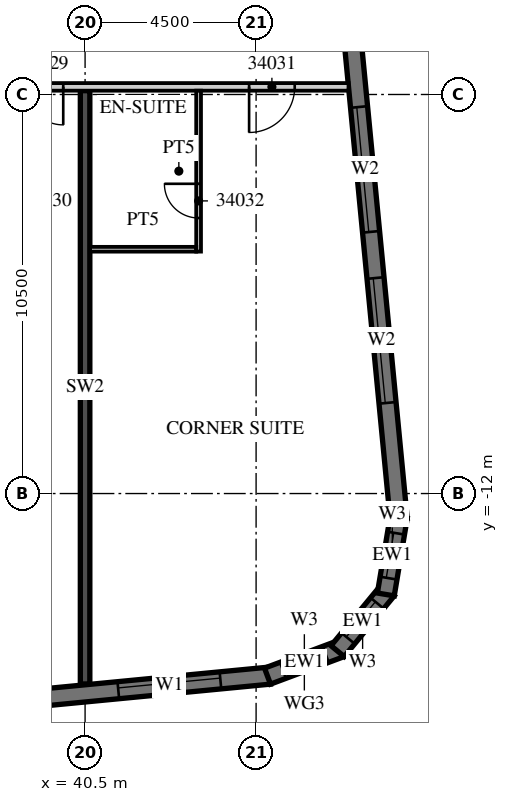
"""IFC4 building model, lengths in metres.
Left out: names, types, materials, properties, quantities, classifications, styles, units other than length and angle.
Written with IfcOpenShell. Run it as: python <this file> out.ifc"""

import sys

from ifc_helpers import new_model, si_unit, direction, frame, frame_2d, origin, place, context, subcontext, project, spatial, polyline, rectangle, outline, extrude, element, fill, save


model = new_model("IFC4")
c1 = context("Model", 3, precision=1e-05, world=origin(), true_north=direction((0.0, 1.0)))
c2 = subcontext(c1, "Body", "Model", "MODEL_VIEW")
j1 = project(units=[si_unit("LENGTHUNIT", "METRE"), si_unit("PLANEANGLEUNIT", "RADIAN")], contexts=[c1])
p1 = place(None, origin())
s1 = spatial("IfcSite", under=j1, at=p1, CompositionType="ELEMENT")
p2 = place(p1, origin())
s2 = spatial("IfcBuilding", under=s1, at=p2, CompositionType="ELEMENT")
p3 = place(p2, frame((0.0, 0.0, 147.1)))
s3 = spatial("IfcBuildingStorey", under=s2, at=p3, CompositionType="ELEMENT", Elevation=147.1)
p4 = place(p3, frame((40.5, -17.011, 0.0), z_axis=(0.0, 0.0, 1.0), x_axis=(0.0, 1.0, 0.0)))
e1 = element("IfcWall", 1, at=p4, inside=s3, PredefinedType="SHEAR", context=c2, shape_type="SweptSolid", body=[
    extrude(rectangle(XDim=15.611, YDim=0.25, at=frame_2d((7.805, 0.0))), origin(), (0.0, 0.0, 1.0), 3.0),
])
p5 = place(p3, frame((-13.521, -22.46, 0.0), z_axis=(0.0, 0.0, 1.0), x_axis=(0.995396096335, 0.095846812164, 0.0)))
e2 = element("IfcWall", 2, at=p5, inside=s3, PredefinedType="SOLIDWALL", context=c2, shape_type="SweptSolid", body=[
    extrude(rectangle(XDim=59.151, YDim=0.45, at=frame_2d((29.575, 0.0))), origin(), (0.0, 0.0, 1.0), 3.0),
])
p6 = place(p5, frame((0.91, 0.0, 0.45)))
e3 = element("IfcOpeningElement", 3, at=p6, cuts=e2, PredefinedType="OPENING", context=c2, shape_type="SweptSolid", body=[
    extrude(rectangle(XDim=2.7, YDim=2.25, at=frame_2d((1.35, 1.125))), frame((0.0, 0.235, 0.0), z_axis=(0.0, -1.0, 0.0), x_axis=(1.0, 0.0, 0.0)), (0.0, 0.0, 1.0), 0.47),
])
p7 = place(p5, frame((5.431, 0.0, 0.45)))
e4 = element("IfcOpeningElement", 4, at=p7, cuts=e2, PredefinedType="OPENING", context=c2, shape_type="SweptSolid", body=[
    extrude(rectangle(XDim=2.7, YDim=2.25, at=frame_2d((1.35, 1.125))), frame((0.0, 0.235, 0.0), z_axis=(0.0, -1.0, 0.0), x_axis=(1.0, 0.0, 0.0)), (0.0, 0.0, 1.0), 0.47),
])
p8 = place(p5, frame((9.952, 0.0, 0.45)))
e5 = element("IfcOpeningElement", 5, at=p8, cuts=e2, PredefinedType="OPENING", context=c2, shape_type="SweptSolid", body=[
    extrude(rectangle(XDim=2.7, YDim=2.25, at=frame_2d((1.35, 1.125))), frame((0.0, 0.235, 0.0), z_axis=(0.0, -1.0, 0.0), x_axis=(1.0, 0.0, 0.0)), (0.0, 0.0, 1.0), 0.47),
])
p9 = place(p5, frame((14.473, 0.0, 0.45)))
e6 = element("IfcOpeningElement", 6, at=p9, cuts=e2, PredefinedType="OPENING", context=c2, shape_type="SweptSolid", body=[
    extrude(rectangle(XDim=2.7, YDim=2.25, at=frame_2d((1.35, 1.125))), frame((0.0, 0.235, 0.0), z_axis=(0.0, -1.0, 0.0), x_axis=(1.0, 0.0, 0.0)), (0.0, 0.0, 1.0), 0.47),
])
p10 = place(p5, frame((18.994, 0.0, 0.45)))
e7 = element("IfcOpeningElement", 7, at=p10, cuts=e2, PredefinedType="OPENING", context=c2, shape_type="SweptSolid", body=[
    extrude(rectangle(XDim=2.7, YDim=2.25, at=frame_2d((1.35, 1.125))), frame((0.0, 0.235, 0.0), z_axis=(0.0, -1.0, 0.0), x_axis=(1.0, 0.0, 0.0)), (0.0, 0.0, 1.0), 0.47),
])
p11 = place(p5, frame((23.514, 0.0, 0.45)))
e8 = element("IfcOpeningElement", 8, at=p11, cuts=e2, PredefinedType="OPENING", context=c2, shape_type="SweptSolid", body=[
    extrude(rectangle(XDim=2.7, YDim=2.25, at=frame_2d((1.35, 1.125))), frame((0.0, 0.235, 0.0), z_axis=(0.0, -1.0, 0.0), x_axis=(1.0, 0.0, 0.0)), (0.0, 0.0, 1.0), 0.47),
])
p12 = place(p5, frame((28.035, 0.0, 0.45)))
e9 = element("IfcOpeningElement", 9, at=p12, cuts=e2, PredefinedType="OPENING", context=c2, shape_type="SweptSolid", body=[
    extrude(rectangle(XDim=2.7, YDim=2.25, at=frame_2d((1.35, 1.125))), frame((0.0, 0.235, 0.0), z_axis=(0.0, -1.0, 0.0), x_axis=(1.0, 0.0, 0.0)), (0.0, 0.0, 1.0), 0.47),
])
p13 = place(p5, frame((32.556, 0.0, 0.45)))
e10 = element("IfcOpeningElement", 10, at=p13, cuts=e2, PredefinedType="OPENING", context=c2, shape_type="SweptSolid", body=[
    extrude(rectangle(XDim=2.7, YDim=2.25, at=frame_2d((1.35, 1.125))), frame((0.0, 0.235, 0.0), z_axis=(0.0, -1.0, 0.0), x_axis=(1.0, 0.0, 0.0)), (0.0, 0.0, 1.0), 0.47),
])
p14 = place(p5, frame((37.077, 0.0, 0.45)))
e11 = element("IfcOpeningElement", 11, at=p14, cuts=e2, PredefinedType="OPENING", context=c2, shape_type="SweptSolid", body=[
    extrude(rectangle(XDim=2.7, YDim=2.25, at=frame_2d((1.35, 1.125))), frame((0.0, 0.235, 0.0), z_axis=(0.0, -1.0, 0.0), x_axis=(1.0, 0.0, 0.0)), (0.0, 0.0, 1.0), 0.47),
])
p15 = place(p5, frame((41.598, 0.0, 0.45)))
e12 = element("IfcOpeningElement", 12, at=p15, cuts=e2, PredefinedType="OPENING", context=c2, shape_type="SweptSolid", body=[
    extrude(rectangle(XDim=2.7, YDim=2.25, at=frame_2d((1.35, 1.125))), frame((0.0, 0.235, 0.0), z_axis=(0.0, -1.0, 0.0), x_axis=(1.0, 0.0, 0.0)), (0.0, 0.0, 1.0), 0.47),
])
p16 = place(p5, frame((46.118, 0.0, 0.45)))
e13 = element("IfcOpeningElement", 13, at=p16, cuts=e2, PredefinedType="OPENING", context=c2, shape_type="SweptSolid", body=[
    extrude(rectangle(XDim=2.7, YDim=2.25, at=frame_2d((1.35, 1.125))), frame((0.0, 0.235, 0.0), z_axis=(0.0, -1.0, 0.0), x_axis=(1.0, 0.0, 0.0)), (0.0, 0.0, 1.0), 0.47),
])
p17 = place(p5, frame((50.639, 0.0, 0.45)))
e14 = element("IfcOpeningElement", 14, at=p17, cuts=e2, PredefinedType="OPENING", context=c2, shape_type="SweptSolid", body=[
    extrude(rectangle(XDim=2.7, YDim=2.25, at=frame_2d((1.35, 1.125))), frame((0.0, 0.235, 0.0), z_axis=(0.0, -1.0, 0.0), x_axis=(1.0, 0.0, 0.0)), (0.0, 0.0, 1.0), 0.47),
])
p18 = place(p5, frame((55.15, 0.0, 0.45)))
e15 = element("IfcOpeningElement", 15, at=p18, cuts=e2, PredefinedType="OPENING", context=c2, shape_type="SweptSolid", body=[
    extrude(rectangle(XDim=2.7, YDim=2.25, at=frame_2d((1.35, 1.125))), frame((0.0, 0.235, 0.0), z_axis=(0.0, -1.0, 0.0), x_axis=(1.0, 0.0, 0.0)), (0.0, 0.0, 1.0), 0.47),
])
p19 = place(p3, frame((45.3, -16.804, 0.0), z_axis=(0.0, 0.0, 1.0), x_axis=(0.936677599948, 0.350192909346, 0.0)))
e16 = element("IfcWall", 16, at=p19, inside=s3, PredefinedType="SOLIDWALL", context=c2, shape_type="SweptSolid", body=[
    extrude(outline(polyline([(0.0, -0.225), (2.071, -0.225), (1.95, 0.225), (0.121, 0.225), (0.0, -0.225)])), origin(), (0.0, 0.0, 1.0), 3.0),
])
p20 = place(p19, frame((0.435, 0.0, 0.45)))
e17 = element("IfcOpeningElement", 17, at=p20, cuts=e16, PredefinedType="OPENING", context=c2, shape_type="SweptSolid", body=[
    extrude(rectangle(XDim=1.2, YDim=2.25, at=frame_2d((0.6, 1.125))), frame((0.0, 0.235, 0.0), z_axis=(0.0, -1.0, 0.0), x_axis=(1.0, 0.0, 0.0)), (0.0, 0.0, 1.0), 0.47),
])
p21 = place(p3, frame((47.145, -16.147, 0.0), z_axis=(0.0, 0.0, 1.0), x_axis=(0.635988241739, 0.771698747161, 0.0)))
e18 = element("IfcWall", 18, at=p21, inside=s3, PredefinedType="SOLIDWALL", context=c2, shape_type="SweptSolid", body=[
    extrude(outline(polyline([(0.0, -0.225), (2.071, -0.225), (1.95, 0.225), (0.121, 0.225), (0.0, -0.225)])), origin(), (0.0, 0.0, 1.0), 3.0),
])
p22 = place(p21, frame((0.435, 0.0, 0.45)))
e19 = element("IfcOpeningElement", 19, at=p22, cuts=e18, PredefinedType="OPENING", context=c2, shape_type="SweptSolid", body=[
    extrude(rectangle(XDim=1.2, YDim=2.25, at=frame_2d((0.6, 1.125))), frame((0.0, 0.235, 0.0), z_axis=(0.0, -1.0, 0.0), x_axis=(1.0, 0.0, 0.0)), (0.0, 0.0, 1.0), 0.47),
])
p23 = place(p3, frame((48.413, -14.655, 0.0), z_axis=(0.0, 0.0, 1.0), x_axis=(0.165068144653, 0.986282164302, 0.0)))
e20 = element("IfcWall", 20, at=p23, inside=s3, PredefinedType="SOLIDWALL", context=c2, shape_type="SweptSolid", body=[
    extrude(outline(polyline([(0.0, -0.225), (2.071, -0.225), (1.95, 0.225), (0.121, 0.225), (0.0, -0.225)])), origin(), (0.0, 0.0, 1.0), 3.0),
])
p24 = place(p23, frame((0.435, 0.0, 0.45)))
e21 = element("IfcOpeningElement", 21, at=p24, cuts=e20, PredefinedType="OPENING", context=c2, shape_type="SweptSolid", body=[
    extrude(rectangle(XDim=1.2, YDim=2.25, at=frame_2d((0.6, 1.125))), frame((0.0, 0.235, 0.0), z_axis=(0.0, -1.0, 0.0), x_axis=(1.0, 0.0, 0.0)), (0.0, 0.0, 1.0), 0.47),
])
p25 = place(p3, frame((48.753, -12.672, 0.0), z_axis=(0.0, 0.0, 1.0), x_axis=(-0.095842661909, 0.995396495954, 0.0)))
e22 = element("IfcWall", 22, at=p25, inside=s3, PredefinedType="SOLIDWALL", context=c2, shape_type="SweptSolid", body=[
    extrude(rectangle(XDim=35.0, YDim=0.45, at=frame_2d((17.5, 0.0))), origin(), (0.0, 0.0, 1.0), 3.0),
])
p26 = place(p25, frame((3.072, 0.0, 0.45)))
e23 = element("IfcOpeningElement", 23, at=p26, cuts=e22, PredefinedType="OPENING", context=c2, shape_type="SweptSolid", body=[
    extrude(rectangle(XDim=3.3, YDim=2.25, at=frame_2d((1.65, 1.125))), frame((0.0, 0.235, 0.0), z_axis=(0.0, -1.0, 0.0), x_axis=(1.0, 0.0, 0.0)), (0.0, 0.0, 1.0), 0.47),
])
p27 = place(p25, frame((7.593, 0.0, 0.45)))
e24 = element("IfcOpeningElement", 24, at=p27, cuts=e22, PredefinedType="OPENING", context=c2, shape_type="SweptSolid", body=[
    extrude(rectangle(XDim=3.3, YDim=2.25, at=frame_2d((1.65, 1.125))), frame((0.0, 0.235, 0.0), z_axis=(0.0, -1.0, 0.0), x_axis=(1.0, 0.0, 0.0)), (0.0, 0.0, 1.0), 0.47),
])
p28 = place(p3, frame((-13.5, -1.3, 0.0), z_axis=(0.0, 0.0, 1.0), x_axis=(1.0, 0.0, 0.0)))
e25 = element("IfcWall", 25, at=p28, inside=s3, PredefinedType="PARTITIONING", context=c2, shape_type="SweptSolid", body=[
    extrude(rectangle(XDim=60.932, YDim=0.2, at=frame_2d((30.466, 0.0))), origin(), (0.0, 0.0, 1.0), 3.0),
])
p29 = place(p28, frame((2.925, 0.0, 0.0)))
e26 = element("IfcOpeningElement", 26, at=p29, cuts=e25, PredefinedType="OPENING", context=c2, shape_type="SweptSolid", body=[
    extrude(rectangle(XDim=1.0, YDim=2.1, at=frame_2d((0.5, 1.05))), frame((0.0, 0.11, 0.0), z_axis=(0.0, -1.0, 0.0), x_axis=(1.0, 0.0, 0.0)), (0.0, 0.0, 1.0), 0.22),
])
p30 = place(p28, frame((6.938, 0.0, 0.0)))
e27 = element("IfcOpeningElement", 27, at=p30, cuts=e25, PredefinedType="OPENING", context=c2, shape_type="SweptSolid", body=[
    extrude(rectangle(XDim=1.2, YDim=2.1, at=frame_2d((0.6, 1.05))), frame((0.0, 0.11, 0.0), z_axis=(0.0, -1.0, 0.0), x_axis=(1.0, 0.0, 0.0)), (0.0, 0.0, 1.0), 0.22),
])
p31 = place(p28, frame((15.938, 0.0, 0.0)))
e28 = element("IfcOpeningElement", 28, at=p31, cuts=e25, PredefinedType="OPENING", context=c2, shape_type="SweptSolid", body=[
    extrude(rectangle(XDim=1.2, YDim=2.1, at=frame_2d((0.6, 1.05))), frame((0.0, 0.11, 0.0), z_axis=(0.0, -1.0, 0.0), x_axis=(1.0, 0.0, 0.0)), (0.0, 0.0, 1.0), 0.22),
])
p32 = place(p28, frame((24.938, 0.0, 0.0)))
e29 = element("IfcOpeningElement", 29, at=p32, cuts=e25, PredefinedType="OPENING", context=c2, shape_type="SweptSolid", body=[
    extrude(rectangle(XDim=1.2, YDim=2.1, at=frame_2d((0.6, 1.05))), frame((0.0, 0.11, 0.0), z_axis=(0.0, -1.0, 0.0), x_axis=(1.0, 0.0, 0.0)), (0.0, 0.0, 1.0), 0.22),
])
p33 = place(p28, frame((32.075, 0.0, 0.0)))
e30 = element("IfcOpeningElement", 30, at=p33, cuts=e25, PredefinedType="OPENING", context=c2, shape_type="SweptSolid", body=[
    extrude(rectangle(XDim=1.0, YDim=2.1, at=frame_2d((0.5, 1.05))), frame((0.0, 0.11, 0.0), z_axis=(0.0, -1.0, 0.0), x_axis=(1.0, 0.0, 0.0)), (0.0, 0.0, 1.0), 0.22),
])
p34 = place(p28, frame((36.55, 0.0, 0.0)))
e31 = element("IfcOpeningElement", 31, at=p34, cuts=e25, PredefinedType="OPENING", context=c2, shape_type="SweptSolid", body=[
    extrude(rectangle(XDim=1.0, YDim=2.1, at=frame_2d((0.5, 1.05))), frame((0.0, 0.11, 0.0), z_axis=(0.0, -1.0, 0.0), x_axis=(1.0, 0.0, 0.0)), (0.0, 0.0, 1.0), 0.22),
])
p35 = place(p28, frame((42.938, 0.0, 0.0)))
e32 = element("IfcOpeningElement", 32, at=p35, cuts=e25, PredefinedType="OPENING", context=c2, shape_type="SweptSolid", body=[
    extrude(rectangle(XDim=1.2, YDim=2.1, at=frame_2d((0.6, 1.05))), frame((0.0, 0.11, 0.0), z_axis=(0.0, -1.0, 0.0), x_axis=(1.0, 0.0, 0.0)), (0.0, 0.0, 1.0), 0.22),
])
p36 = place(p28, frame((52.425, 0.0, 0.0)))
e33 = element("IfcOpeningElement", 33, at=p36, cuts=e25, PredefinedType="OPENING", context=c2, shape_type="SweptSolid", body=[
    extrude(rectangle(XDim=1.0, YDim=2.1, at=frame_2d((0.5, 1.05))), frame((0.0, 0.11, 0.0), z_axis=(0.0, -1.0, 0.0), x_axis=(1.0, 0.0, 0.0)), (0.0, 0.0, 1.0), 0.22),
])
p37 = place(p28, frame((58.316, 0.0, 0.0)))
e34 = element("IfcOpeningElement", 34, at=p37, cuts=e25, PredefinedType="OPENING", context=c2, shape_type="SweptSolid", body=[
    extrude(rectangle(XDim=1.2, YDim=2.1, at=frame_2d((0.6, 1.05))), frame((0.0, 0.11, 0.0), z_axis=(0.0, -1.0, 0.0), x_axis=(1.0, 0.0, 0.0)), (0.0, 0.0, 1.0), 0.22),
])
p38 = place(p3, frame((43.487, -5.634, 0.0), z_axis=(0.0, 0.0, 1.0), x_axis=(0.0, 1.0, 0.0)))
e35 = element("IfcWall", 35, at=p38, inside=s3, PredefinedType="PARTITIONING", context=c2, shape_type="SweptSolid", body=[
    extrude(rectangle(XDim=4.234, YDim=0.125, at=frame_2d((2.117, 0.0))), origin(), (0.0, 0.0, 1.0), 3.0),
])
p39 = place(p38, frame((0.884, 0.0, 0.0)))
e36 = element("IfcOpeningElement", 36, at=p39, cuts=e35, PredefinedType="OPENING", context=c2, shape_type="SweptSolid", body=[
    extrude(rectangle(XDim=0.9, YDim=2.1, at=frame_2d((0.45, 1.05))), frame((0.0, 0.073, 0.0), z_axis=(0.0, -1.0, 0.0), x_axis=(1.0, 0.0, 0.0)), (0.0, 0.0, 1.0), 0.145),
])
p40 = place(p3, frame((40.625, -5.572, 0.0), z_axis=(0.0, 0.0, 1.0), x_axis=(1.0, 0.0, 0.0)))
e37 = element("IfcWall", 37, at=p40, inside=s3, PredefinedType="PARTITIONING", context=c2, shape_type="SweptSolid", body=[
    extrude(rectangle(XDim=2.8, YDim=0.125, at=frame_2d((1.4, 0.0))), origin(), (0.0, 0.0, 1.0), 3.0),
])
p41 = place(p18, origin())
e38 = element("IfcWindow", 38, at=p41, inside=s3, PartitioningType="SINGLE_PANEL", PredefinedType="WINDOW", context=c2, shape_type="SweptSolid", body=[
    extrude(rectangle(XDim=2.7, YDim=2.25, at=frame_2d((1.35, 1.125))), frame((0.0, 0.09, 0.0), z_axis=(0.0, -1.0, 0.0), x_axis=(1.0, 0.0, 0.0)), (0.0, 0.0, 1.0), 0.06),
])
fill(e15, e38)
p42 = place(p20, origin())
e39 = element("IfcWindow", 39, at=p42, inside=s3, PartitioningType="SINGLE_PANEL", PredefinedType="WINDOW", context=c2, shape_type="SweptSolid", body=[
    extrude(rectangle(XDim=1.2, YDim=2.25, at=frame_2d((0.6, 1.125))), frame((0.0, 0.09, 0.0), z_axis=(0.0, -1.0, 0.0), x_axis=(1.0, 0.0, 0.0)), (0.0, 0.0, 1.0), 0.06),
])
fill(e17, e39)
p43 = place(p22, origin())
e40 = element("IfcWindow", 40, at=p43, inside=s3, PartitioningType="SINGLE_PANEL", PredefinedType="WINDOW", context=c2, shape_type="SweptSolid", body=[
    extrude(rectangle(XDim=1.2, YDim=2.25, at=frame_2d((0.6, 1.125))), frame((0.0, 0.09, 0.0), z_axis=(0.0, -1.0, 0.0), x_axis=(1.0, 0.0, 0.0)), (0.0, 0.0, 1.0), 0.06),
])
fill(e19, e40)
p44 = place(p24, origin())
e41 = element("IfcWindow", 41, at=p44, inside=s3, PartitioningType="SINGLE_PANEL", PredefinedType="WINDOW", context=c2, shape_type="SweptSolid", body=[
    extrude(rectangle(XDim=1.2, YDim=2.25, at=frame_2d((0.6, 1.125))), frame((0.0, 0.09, 0.0), z_axis=(0.0, -1.0, 0.0), x_axis=(1.0, 0.0, 0.0)), (0.0, 0.0, 1.0), 0.06),
])
fill(e21, e41)
p45 = place(p26, origin())
e42 = element("IfcWindow", 42, at=p45, inside=s3, PartitioningType="SINGLE_PANEL", PredefinedType="WINDOW", context=c2, shape_type="SweptSolid", body=[
    extrude(rectangle(XDim=3.3, YDim=2.25, at=frame_2d((1.65, 1.125))), frame((0.0, 0.09, 0.0), z_axis=(0.0, -1.0, 0.0), x_axis=(1.0, 0.0, 0.0)), (0.0, 0.0, 1.0), 0.06),
])
fill(e23, e42)
p46 = place(p27, origin())
e43 = element("IfcWindow", 43, at=p46, inside=s3, PartitioningType="SINGLE_PANEL", PredefinedType="WINDOW", context=c2, shape_type="SweptSolid", body=[
    extrude(rectangle(XDim=3.3, YDim=2.25, at=frame_2d((1.65, 1.125))), frame((0.0, 0.09, 0.0), z_axis=(0.0, -1.0, 0.0), x_axis=(1.0, 0.0, 0.0)), (0.0, 0.0, 1.0), 0.06),
])
fill(e24, e43)
p47 = place(p36, origin())
e44 = element("IfcDoor", 44, at=p47, inside=s3, OperationType="SINGLE_SWING_RIGHT", PredefinedType="DOOR", context=c2, shape_type="SweptSolid", body=[
    extrude(rectangle(XDim=1.0, YDim=2.1, at=frame_2d((0.5, 1.05))), frame((0.0, 0.025, 0.0), z_axis=(0.0, -1.0, 0.0), x_axis=(1.0, 0.0, 0.0)), (0.0, 0.0, 1.0), 0.05),
])
fill(e33, e44)
p48 = place(p37, origin())
e45 = element("IfcDoor", 45, at=p48, inside=s3, OperationType="SINGLE_SWING_LEFT", PredefinedType="DOOR", context=c2, shape_type="SweptSolid", body=[
    extrude(rectangle(XDim=1.2, YDim=2.1, at=frame_2d((0.6, 1.05))), frame((0.0, 0.025, 0.0), z_axis=(0.0, -1.0, 0.0), x_axis=(1.0, 0.0, 0.0)), (0.0, 0.0, 1.0), 0.05),
])
fill(e34, e45)
p49 = place(p39, origin())
e46 = element("IfcDoor", 46, at=p49, inside=s3, OperationType="SINGLE_SWING_RIGHT", PredefinedType="DOOR", context=c2, shape_type="SweptSolid", body=[
    extrude(rectangle(XDim=0.9, YDim=2.1, at=frame_2d((0.45, 1.05))), frame((0.0, 0.025, 0.0), z_axis=(0.0, -1.0, 0.0), x_axis=(1.0, 0.0, 0.0)), (0.0, 0.0, 1.0), 0.05),
])
fill(e36, e46)
save(model, sys.argv[1])
